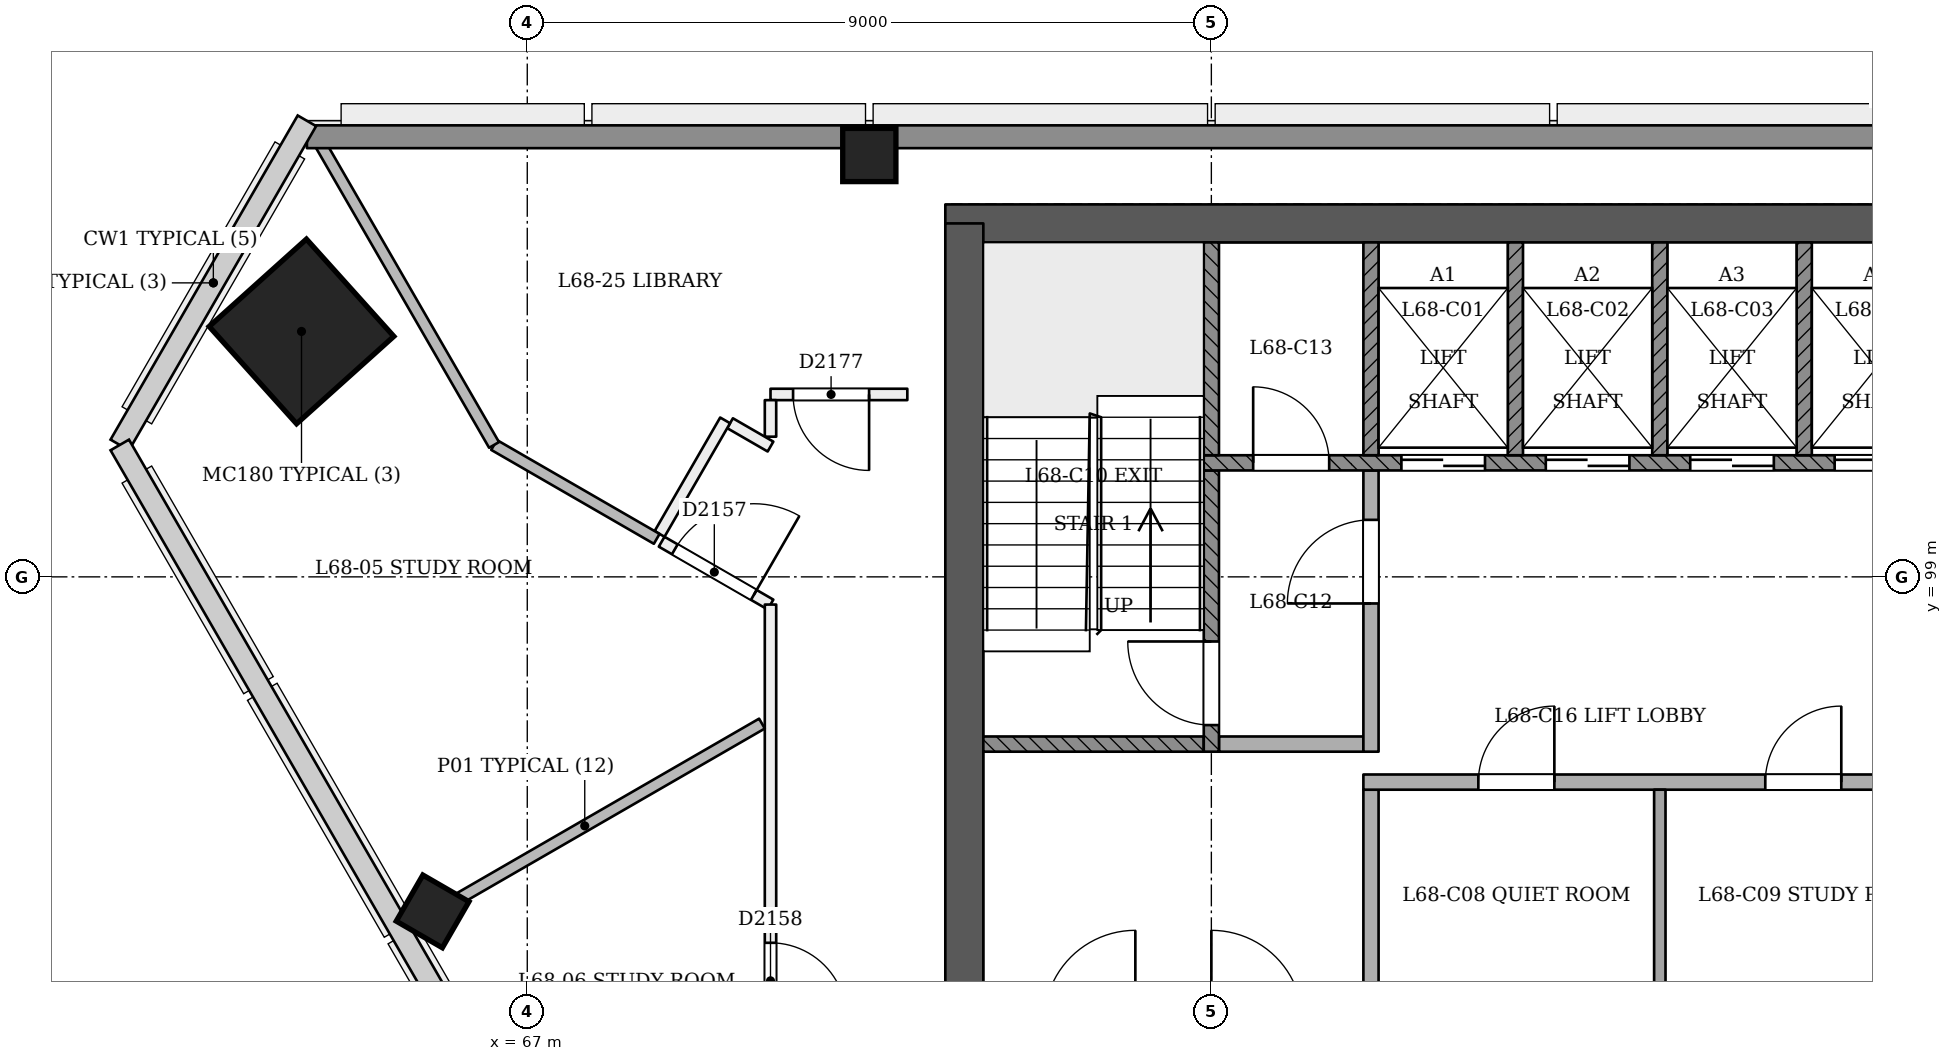
"""IFC4 building model, lengths in metres.
Left out: names, types, materials, properties, quantities, classifications, styles, units other than length and angle.
Written with IfcOpenShell. Run it as: python <this file> out.ifc"""

import sys

from ifc_helpers import new_model, si_unit, direction, frame, frame_2d, origin, origin_2d, place, context, subcontext, project, spatial, rectangle, extrude, element, fill, save


model = new_model("IFC4")
c1 = context("Model", 3, precision=1e-05, world=origin(), true_north=direction((0.0, 1.0)))
c2 = subcontext(c1, "Body", "Model", "MODEL_VIEW")
j1 = project(units=[si_unit("LENGTHUNIT", "METRE"), si_unit("PLANEANGLEUNIT", "RADIAN")], contexts=[c1])
p1 = place(None, origin())
s1 = spatial("IfcSite", under=j1, at=p1, CompositionType="ELEMENT")
p2 = place(p1, origin())
s2 = spatial("IfcBuilding", under=s1, at=p2, CompositionType="ELEMENT")
p3 = place(p2, frame((0.0, 0.0, 264.4)))
s3 = spatial("IfcBuildingStorey", under=s2, at=p3, CompositionType="ELEMENT", Elevation=264.4)
p4 = place(p3, frame((97.25, 103.65, 0.0), z_axis=(0.0, 0.0, 1.0), x_axis=(-1.0, 0.0, 0.0)))
e1 = element("IfcWall", 1, at=p4, inside=s3, PredefinedType="SHEAR", context=c2, shape_type="SweptSolid", body=[
    extrude(rectangle(XDim=24.75, YDim=0.5, at=frame_2d((12.375, 0.0))), origin(), (0.0, 0.0, 1.0), 3.6),
])
p5 = place(p3, frame((72.75, 103.65, 0.0), z_axis=(0.0, 0.0, 1.0), x_axis=(0.0, -1.0, 0.0)))
e2 = element("IfcWall", 2, at=p5, inside=s3, PredefinedType="SHEAR", context=c2, shape_type="SweptSolid", body=[
    extrude(rectangle(XDim=10.75, YDim=0.5, at=frame_2d((5.375, 0.0))), origin(), (0.0, 0.0, 1.0), 3.6),
])
p6 = place(p3, frame((63.996, 102.218, 0.0), z_axis=(0.028401814599, 0.009218727412, 0.999554076572), x_axis=(-0.865120184501, 0.501167311781, 0.019959758776)))
e3 = element("IfcColumn", 3, at=p6, inside=s3, PredefinedType="COLUMN", context=c2, shape_type="SweptSolid", body=[
    extrude(rectangle(XDim=1.72, YDim=1.72, at=origin_2d()), origin(), (0.0, 0.0, 1.0), 3.602),
])
p7 = place(p3, frame((71.5, 104.55, 0.0), z_axis=(0.0, 0.0, 1.0), x_axis=(1.0, 0.0, 0.0)))
e4 = element("IfcColumn", 4, at=p7, inside=s3, PredefinedType="COLUMN", context=c2, shape_type="SweptSolid", body=[
    extrude(rectangle(XDim=0.7, YDim=0.7, at=origin_2d()), origin(), (0.0, 0.0, 1.0), 3.6),
])
p8 = place(p3, frame((65.728, 94.552, -0.023), z_axis=(0.022212328788, 0.038465252292, 0.999013031354), x_axis=(-0.86563975744, -0.499187423735, 0.03846721103)))
e5 = element("IfcColumn", 5, at=p8, inside=s3, PredefinedType="COLUMN", context=c2, shape_type="SweptSolid", body=[
    extrude(rectangle(XDim=0.7, YDim=0.7, at=origin_2d()), origin(), (0.0, 0.0, 1.0), 3.605),
])
p9 = place(p3, frame((68.768, 99.462, 0.0), z_axis=(0.0, 0.0, 1.0), x_axis=(0.866072496716, -0.499918423778, 0.0)))
e6 = element("IfcWall", 6, at=p9, inside=s3, PredefinedType="PARTITIONING", context=c2, shape_type="SweptSolid", body=[
    extrude(rectangle(XDim=1.654, YDim=0.15, at=frame_2d((0.827, 0.0))), origin(), (0.0, 0.0, 1.0), 3.2),
])
p10 = place(p9, frame((0.2, 0.0, 0.0)))
e7 = element("IfcOpeningElement", 7, at=p10, cuts=e6, PredefinedType="OPENING", context=c2, shape_type="SweptSolid", body=[
    extrude(rectangle(XDim=1.2, YDim=2.1, at=frame_2d((0.6, 1.05))), frame((0.0, 0.085, 0.0), z_axis=(0.0, -1.0, 0.0), x_axis=(1.0, 0.0, 0.0)), (0.0, 0.0, 1.0), 0.171),
])
p11 = place(p3, frame((70.2, 98.636, 0.0), z_axis=(0.0, 0.0, 1.0), x_axis=(0.0, -1.0, 0.0)))
e8 = element("IfcWall", 8, at=p11, inside=s3, PredefinedType="PARTITIONING", context=c2, shape_type="SweptSolid", body=[
    extrude(rectangle(XDim=8.036, YDim=0.15, at=frame_2d((4.018, 0.0))), origin(), (0.0, 0.0, 1.0), 3.2),
])
p12 = place(p11, frame((4.45, 0.0, 0.0)))
e9 = element("IfcOpeningElement", 9, at=p12, cuts=e8, PredefinedType="OPENING", context=c2, shape_type="SweptSolid", body=[
    extrude(rectangle(XDim=1.0, YDim=2.1, at=frame_2d((0.5, 1.05))), frame((0.0, 0.085, 0.0), z_axis=(0.0, -1.0, 0.0), x_axis=(1.0, 0.0, 0.0)), (0.0, 0.0, 1.0), 0.171),
])
p13 = place(p3, frame((72.0, 101.4, 0.0), z_axis=(0.0, 0.0, 1.0), x_axis=(-1.0, 0.0, 0.0)))
e10 = element("IfcWall", 10, at=p13, inside=s3, PredefinedType="PARTITIONING", context=c2, shape_type="SweptSolid", body=[
    extrude(rectangle(XDim=1.8, YDim=0.15, at=frame_2d((0.9, 0.0))), origin(), (0.0, 0.0, 1.0), 3.2),
])
p14 = place(p13, frame((0.503, 0.0, 0.0)))
e11 = element("IfcOpeningElement", 11, at=p14, cuts=e10, PredefinedType="OPENING", context=c2, shape_type="SweptSolid", body=[
    extrude(rectangle(XDim=1.0, YDim=2.1, at=frame_2d((0.5, 1.05))), frame((0.0, 0.085, 0.0), z_axis=(0.0, -1.0, 0.0), x_axis=(1.0, 0.0, 0.0)), (0.0, 0.0, 1.0), 0.171),
])
p15 = place(p3, frame((70.2, 101.325, 0.0), z_axis=(0.0, 0.0, 1.0), x_axis=(0.0, -1.0, 0.0)))
e12 = element("IfcWall", 12, at=p15, inside=s3, PredefinedType="PARTITIONING", context=c2, shape_type="SweptSolid", body=[
    extrude(rectangle(XDim=0.481, YDim=0.15, at=frame_2d((0.24, 0.0))), origin(), (0.0, 0.0, 1.0), 3.2),
])
p16 = place(p3, frame((70.2, 100.714, 0.0), z_axis=(0.0, 0.0, 1.0), x_axis=(-0.866033360935, 0.499986217557, 0.0)))
e13 = element("IfcWall", 13, at=p16, inside=s3, PredefinedType="PARTITIONING", context=c2, shape_type="SweptSolid", body=[
    extrude(rectangle(XDim=0.614, YDim=0.15, at=frame_2d((0.307, 0.0))), origin(), (0.0, 0.0, 1.0), 3.2),
])
p17 = place(p3, frame((69.603, 101.059, 0.0), z_axis=(0.0, 0.0, 1.0), x_axis=(-0.500020560727, -0.866013532718, 0.0)))
e14 = element("IfcWall", 14, at=p17, inside=s3, PredefinedType="PARTITIONING", context=c2, shape_type="SweptSolid", body=[
    extrude(rectangle(XDim=1.725, YDim=0.15, at=frame_2d((0.863, 0.0))), origin(), (0.0, 0.0, 1.0), 3.2),
])
p18 = place(p3, frame((65.425, 94.378, 0.0), z_axis=(0.0, 0.0, 1.0), x_axis=(0.866018689825, 0.500011628738, 0.0)))
e15 = element("IfcWall", 15, at=p18, inside=s3, PredefinedType="PARTITIONING", context=c2, shape_type="SweptSolid", body=[
    extrude(rectangle(XDim=5.384, YDim=0.15, at=frame_2d((2.692, 0.0))), origin(), (0.0, 0.0, 1.0), 2.7),
])
p19 = place(p3, frame((68.703, 99.5, 0.0), z_axis=(0.0, 0.0, 1.0), x_axis=(-0.866002946681, 0.500038894826, 0.0)))
e16 = element("IfcWall", 16, at=p19, inside=s3, PredefinedType="PARTITIONING", context=c2, shape_type="SweptSolid", body=[
    extrude(rectangle(XDim=2.471, YDim=0.15, at=frame_2d((1.235, 0.0))), origin(), (0.0, 0.0, 1.0), 3.2),
])
p20 = place(p3, frame((66.563, 100.736, 0.0), z_axis=(0.0, 0.0, 1.0), x_axis=(-0.500005196218, 0.866022403726, 0.0)))
e17 = element("IfcWall", 17, at=p20, inside=s3, PredefinedType="PARTITIONING", context=c2, shape_type="SweptSolid", body=[
    extrude(rectangle(XDim=4.809, YDim=0.15, at=frame_2d((2.404, 0.0))), origin(), (0.0, 0.0, 1.0), 2.7),
])
p21 = place(p3, frame((64.101, 104.79, 0.0), z_axis=(0.0, 0.0, 1.0), x_axis=(1.0, 0.0, 0.0)))
e18 = element("IfcWall", 18, at=p21, inside=s3, PredefinedType="SOLIDWALL", context=c2, shape_type="SweptSolid", body=[
    extrude(rectangle(XDim=41.798, YDim=0.3, at=frame_2d((20.899, 0.0))), origin(), (0.0, 0.0, 1.0), 2.7),
])
p22 = place(p3, frame((78.1, 93.4, 0.0), z_axis=(0.0, 0.0, 1.0), x_axis=(0.0, 1.0, 0.0)))
e19 = element("IfcWall", 19, at=p22, inside=s3, PredefinedType="PARTITIONING", context=c2, shape_type="SweptSolid", body=[
    extrude(rectangle(XDim=2.8, YDim=0.2, at=frame_2d((1.4, 0.0))), origin(), (0.0, 0.0, 1.0), 3.2),
])
p23 = place(p3, frame((81.9, 93.4, 0.0), z_axis=(0.0, 0.0, 1.0), x_axis=(0.0, 1.0, 0.0)))
e20 = element("IfcWall", 20, at=p23, inside=s3, PredefinedType="PARTITIONING", context=c2, shape_type="SweptSolid", body=[
    extrude(rectangle(XDim=2.8, YDim=0.15, at=frame_2d((1.4, 0.0))), origin(), (0.0, 0.0, 1.0), 3.2),
])
p24 = place(p3, frame((78.0, 96.3, 0.0), z_axis=(0.0, 0.0, 1.0), x_axis=(1.0, 0.0, 0.0)))
e21 = element("IfcWall", 21, at=p24, inside=s3, PredefinedType="PARTITIONING", context=c2, shape_type="SweptSolid", body=[
    extrude(rectangle(XDim=7.8, YDim=0.2, at=frame_2d((3.9, 0.0))), origin(), (0.0, 0.0, 1.0), 3.2),
])
p25 = place(p24, frame((1.512, 0.0, 0.0)))
e22 = element("IfcOpeningElement", 22, at=p25, cuts=e21, PredefinedType="OPENING", context=c2, shape_type="SweptSolid", body=[
    extrude(rectangle(XDim=1.0, YDim=2.1, at=frame_2d((0.5, 1.05))), frame((0.0, 0.11, 0.0), z_axis=(0.0, -1.0, 0.0), x_axis=(1.0, 0.0, 0.0)), (0.0, 0.0, 1.0), 0.221),
])
p26 = place(p24, frame((5.288, 0.0, 0.0)))
e23 = element("IfcOpeningElement", 23, at=p26, cuts=e21, PredefinedType="OPENING", context=c2, shape_type="SweptSolid", body=[
    extrude(rectangle(XDim=1.0, YDim=2.1, at=frame_2d((0.5, 1.05))), frame((0.0, 0.11, 0.0), z_axis=(0.0, -1.0, 0.0), x_axis=(1.0, 0.0, 0.0)), (0.0, 0.0, 1.0), 0.221),
])
p27 = place(p3, frame((73.0, 96.8, 0.0), z_axis=(0.0, 0.0, 1.0), x_axis=(1.0, 0.0, 0.0)))
e24 = element("IfcWall", 24, at=p27, inside=s3, PredefinedType="SOLIDWALL", context=c2, shape_type="SweptSolid", body=[
    extrude(rectangle(XDim=2.9, YDim=0.2, at=frame_2d((1.45, 0.0))), origin(), (0.0, 0.0, 1.0), 3.2),
])
p28 = place(p3, frame((76.0, 96.7, 0.0), z_axis=(0.0, 0.0, 1.0), x_axis=(0.0, 1.0, 0.0)))
e25 = element("IfcWall", 25, at=p28, inside=s3, PredefinedType="SOLIDWALL", context=c2, shape_type="SweptSolid", body=[
    extrude(rectangle(XDim=3.7, YDim=0.2, at=frame_2d((1.85, 0.0))), origin(), (0.0, 0.0, 1.0), 3.2),
])
p29 = place(p28, frame((0.35, 0.0, 0.0)))
e26 = element("IfcOpeningElement", 26, at=p29, cuts=e25, PredefinedType="OPENING", context=c2, shape_type="SweptSolid", body=[
    extrude(rectangle(XDim=1.1, YDim=2.1, at=frame_2d((0.55, 1.05))), frame((0.0, 0.11, 0.0), z_axis=(0.0, -1.0, 0.0), x_axis=(1.0, 0.0, 0.0)), (0.0, 0.0, 1.0), 0.221),
])
p30 = place(p3, frame((76.1, 96.8, 0.0), z_axis=(0.0, 0.0, 1.0), x_axis=(1.0, 0.0, 0.0)))
e27 = element("IfcWall", 27, at=p30, inside=s3, PredefinedType="PARTITIONING", context=c2, shape_type="SweptSolid", body=[
    extrude(rectangle(XDim=1.9, YDim=0.2, at=frame_2d((0.95, 0.0))), origin(), (0.0, 0.0, 1.0), 3.2),
])
p31 = place(p3, frame((78.1, 96.7, 0.0), z_axis=(0.0, 0.0, 1.0), x_axis=(0.0, 1.0, 0.0)))
e28 = element("IfcWall", 28, at=p31, inside=s3, PredefinedType="PARTITIONING", context=c2, shape_type="SweptSolid", body=[
    extrude(rectangle(XDim=3.7, YDim=0.2, at=frame_2d((1.85, 0.0))), origin(), (0.0, 0.0, 1.0), 3.2),
])
p32 = place(p31, frame((1.95, 0.0, 0.0)))
e29 = element("IfcOpeningElement", 29, at=p32, cuts=e28, PredefinedType="OPENING", context=c2, shape_type="SweptSolid", body=[
    extrude(rectangle(XDim=1.1, YDim=2.1, at=frame_2d((0.55, 1.05))), frame((0.0, 0.11, 0.0), z_axis=(0.0, -1.0, 0.0), x_axis=(1.0, 0.0, 0.0)), (0.0, 0.0, 1.0), 0.221),
])
p33 = place(p3, frame((75.9, 100.5, 0.0), z_axis=(0.0, 0.0, 1.0), x_axis=(1.0, 0.0, 0.0)))
e30 = element("IfcWall", 30, at=p33, inside=s3, PredefinedType="SOLIDWALL", context=c2, shape_type="SweptSolid", body=[
    extrude(rectangle(XDim=18.2, YDim=0.2, at=frame_2d((9.1, 0.0))), origin(), (0.0, 0.0, 1.0), 3.2),
])
p34 = place(p33, frame((2.6, 0.0, 0.0)))
e31 = element("IfcOpeningElement", 31, at=p34, cuts=e30, PredefinedType="OPENING", context=c2, shape_type="SweptSolid", body=[
    extrude(rectangle(XDim=1.1, YDim=2.1, at=frame_2d((0.55, 1.05))), frame((0.0, 0.11, 0.0), z_axis=(0.0, -1.0, 0.0), x_axis=(1.0, 0.0, 0.0)), (0.0, 0.0, 1.0), 0.221),
])
p35 = place(p33, frame((4.5, 0.0, 0.0)))
e32 = element("IfcOpeningElement", 32, at=p35, cuts=e30, PredefinedType="OPENING", context=c2, shape_type="SweptSolid", body=[
    extrude(rectangle(XDim=1.1, YDim=2.1, at=frame_2d((0.55, 1.05))), frame((0.0, 0.11, 0.0), z_axis=(0.0, -1.0, 0.0), x_axis=(1.0, 0.0, 0.0)), (0.0, 0.0, 1.0), 0.221),
])
p36 = place(p33, frame((6.4, 0.0, 0.0)))
e33 = element("IfcOpeningElement", 33, at=p36, cuts=e30, PredefinedType="OPENING", context=c2, shape_type="SweptSolid", body=[
    extrude(rectangle(XDim=1.1, YDim=2.1, at=frame_2d((0.55, 1.05))), frame((0.0, 0.11, 0.0), z_axis=(0.0, -1.0, 0.0), x_axis=(1.0, 0.0, 0.0)), (0.0, 0.0, 1.0), 0.221),
])
p37 = place(p33, frame((8.3, 0.0, 0.0)))
e34 = element("IfcOpeningElement", 34, at=p37, cuts=e30, PredefinedType="OPENING", context=c2, shape_type="SweptSolid", body=[
    extrude(rectangle(XDim=1.1, YDim=2.1, at=frame_2d((0.55, 1.05))), frame((0.0, 0.11, 0.0), z_axis=(0.0, -1.0, 0.0), x_axis=(1.0, 0.0, 0.0)), (0.0, 0.0, 1.0), 0.221),
])
p38 = place(p33, frame((10.2, 0.0, 0.0)))
e35 = element("IfcOpeningElement", 35, at=p38, cuts=e30, PredefinedType="OPENING", context=c2, shape_type="SweptSolid", body=[
    extrude(rectangle(XDim=1.1, YDim=2.1, at=frame_2d((0.55, 1.05))), frame((0.0, 0.11, 0.0), z_axis=(0.0, -1.0, 0.0), x_axis=(1.0, 0.0, 0.0)), (0.0, 0.0, 1.0), 0.221),
])
p39 = place(p33, frame((12.1, 0.0, 0.0)))
e36 = element("IfcOpeningElement", 36, at=p39, cuts=e30, PredefinedType="OPENING", context=c2, shape_type="SweptSolid", body=[
    extrude(rectangle(XDim=1.1, YDim=2.1, at=frame_2d((0.55, 1.05))), frame((0.0, 0.11, 0.0), z_axis=(0.0, -1.0, 0.0), x_axis=(1.0, 0.0, 0.0)), (0.0, 0.0, 1.0), 0.221),
])
p40 = place(p33, frame((14.0, 0.0, 0.0)))
e37 = element("IfcOpeningElement", 37, at=p40, cuts=e30, PredefinedType="OPENING", context=c2, shape_type="SweptSolid", body=[
    extrude(rectangle(XDim=1.1, YDim=2.1, at=frame_2d((0.55, 1.05))), frame((0.0, 0.11, 0.0), z_axis=(0.0, -1.0, 0.0), x_axis=(1.0, 0.0, 0.0)), (0.0, 0.0, 1.0), 0.221),
])
p41 = place(p33, frame((0.65, 0.0, 0.0)))
e38 = element("IfcOpeningElement", 38, at=p41, cuts=e30, PredefinedType="OPENING", context=c2, shape_type="SweptSolid", body=[
    extrude(rectangle(XDim=1.0, YDim=2.1, at=frame_2d((0.5, 1.05))), frame((0.0, 0.11, 0.0), z_axis=(0.0, -1.0, 0.0), x_axis=(1.0, 0.0, 0.0)), (0.0, 0.0, 1.0), 0.221),
])
p42 = place(p33, frame((16.3, 0.0, 0.0)))
e39 = element("IfcOpeningElement", 39, at=p42, cuts=e30, PredefinedType="OPENING", context=c2, shape_type="SweptSolid", body=[
    extrude(rectangle(XDim=1.0, YDim=2.1, at=frame_2d((0.5, 1.05))), frame((0.0, 0.11, 0.0), z_axis=(0.0, -1.0, 0.0), x_axis=(1.0, 0.0, 0.0)), (0.0, 0.0, 1.0), 0.221),
])
for number, where, z_axis, x_axis in (
    (40, (76.0, 100.6, 0.0), (0.0, 0.0, 1.0), (0.0, 1.0, 0.0)),
    (41, (78.1, 100.6, 0.0), (0.0, 0.0, 1.0), (0.0, 1.0, 0.0)),
    (42, (80.0, 100.6, 0.0), (0.0, 0.0, 1.0), (0.0, 1.0, 0.0)),
    (43, (81.9, 100.6, 0.0), (0.0, 0.0, 1.0), (0.0, 1.0, 0.0)),
    (44, (83.8, 100.6, 0.0), (0.0, 0.0, 1.0), (0.0, 1.0, 0.0)),
):
    element("IfcWall", number, at=place(p3, frame(where, z_axis=z_axis, x_axis=x_axis)), inside=s3, PredefinedType="SOLIDWALL", context=c2, shape_type="SweptSolid", body=[
        extrude(rectangle(XDim=2.8, YDim=0.2, at=frame_2d((1.4, 0.0))), origin(), (0.0, 0.0, 1.0), 3.2),
    ])
p43 = place(p10, origin())
e45 = element("IfcDoor", 45, at=p43, inside=s3, OperationType="SINGLE_SWING_RIGHT", PredefinedType="NOTDEFINED", context=c2, shape_type="SweptSolid", body=[
    extrude(rectangle(XDim=1.2, YDim=2.1, at=frame_2d((0.6, 1.05))), frame((0.0, 0.025, 0.0), z_axis=(0.0, -1.0, 0.0), x_axis=(1.0, 0.0, 0.0)), (0.0, 0.0, 1.0), 0.05),
])
fill(e7, e45)
p44 = place(p12, origin())
e46 = element("IfcDoor", 46, at=p44, inside=s3, OperationType="SINGLE_SWING_RIGHT", PredefinedType="NOTDEFINED", context=c2, shape_type="SweptSolid", body=[
    extrude(rectangle(XDim=1.0, YDim=2.1, at=frame_2d((0.5, 1.05))), frame((0.0, 0.025, 0.0), z_axis=(0.0, -1.0, 0.0), x_axis=(1.0, 0.0, 0.0)), (0.0, 0.0, 1.0), 0.05),
])
fill(e9, e46)
p45 = place(p14, origin())
e47 = element("IfcDoor", 47, at=p45, inside=s3, OperationType="SINGLE_SWING_LEFT", PredefinedType="NOTDEFINED", context=c2, shape_type="SweptSolid", body=[
    extrude(rectangle(XDim=1.0, YDim=2.1, at=frame_2d((0.5, 1.05))), frame((0.0, 0.025, 0.0), z_axis=(0.0, -1.0, 0.0), x_axis=(1.0, 0.0, 0.0)), (0.0, 0.0, 1.0), 0.05),
])
fill(e11, e47)
p46 = place(p34, origin())
e48 = element("IfcDoor", 48, at=p46, inside=s3, OperationType="SLIDING_TO_RIGHT", PredefinedType="NOTDEFINED", context=c2, shape_type="SweptSolid", body=[
    extrude(rectangle(XDim=1.1, YDim=2.1, at=frame_2d((0.55, 1.05))), frame((0.0, 0.025, 0.0), z_axis=(0.0, -1.0, 0.0), x_axis=(1.0, 0.0, 0.0)), (0.0, 0.0, 1.0), 0.05),
])
fill(e31, e48)
p47 = place(p35, origin())
e49 = element("IfcDoor", 49, at=p47, inside=s3, OperationType="SLIDING_TO_LEFT", PredefinedType="NOTDEFINED", context=c2, shape_type="SweptSolid", body=[
    extrude(rectangle(XDim=1.1, YDim=2.1, at=frame_2d((0.55, 1.05))), frame((0.0, 0.025, 0.0), z_axis=(0.0, -1.0, 0.0), x_axis=(1.0, 0.0, 0.0)), (0.0, 0.0, 1.0), 0.05),
])
fill(e32, e49)
p48 = place(p36, origin())
e50 = element("IfcDoor", 50, at=p48, inside=s3, OperationType="SLIDING_TO_RIGHT", PredefinedType="NOTDEFINED", context=c2, shape_type="SweptSolid", body=[
    extrude(rectangle(XDim=1.1, YDim=2.1, at=frame_2d((0.55, 1.05))), frame((0.0, 0.025, 0.0), z_axis=(0.0, -1.0, 0.0), x_axis=(1.0, 0.0, 0.0)), (0.0, 0.0, 1.0), 0.05),
])
fill(e33, e50)
p49 = place(p37, origin())
e51 = element("IfcDoor", 51, at=p49, inside=s3, OperationType="SLIDING_TO_LEFT", PredefinedType="NOTDEFINED", context=c2, shape_type="SweptSolid", body=[
    extrude(rectangle(XDim=1.1, YDim=2.1, at=frame_2d((0.55, 1.05))), frame((0.0, 0.025, 0.0), z_axis=(0.0, -1.0, 0.0), x_axis=(1.0, 0.0, 0.0)), (0.0, 0.0, 1.0), 0.05),
])
fill(e34, e51)
p50 = place(p29, origin())
e52 = element("IfcDoor", 52, at=p50, inside=s3, OperationType="SINGLE_SWING_RIGHT", PredefinedType="NOTDEFINED", context=c2, shape_type="SweptSolid", body=[
    extrude(rectangle(XDim=1.1, YDim=2.1, at=frame_2d((0.55, 1.05))), frame((0.0, 0.025, 0.0), z_axis=(0.0, -1.0, 0.0), x_axis=(1.0, 0.0, 0.0)), (0.0, 0.0, 1.0), 0.05),
])
fill(e26, e52)
p51 = place(p32, origin())
e53 = element("IfcDoor", 53, at=p51, inside=s3, OperationType="SINGLE_SWING_LEFT", PredefinedType="NOTDEFINED", context=c2, shape_type="SweptSolid", body=[
    extrude(rectangle(XDim=1.1, YDim=2.1, at=frame_2d((0.55, 1.05))), frame((0.0, 0.025, 0.0), z_axis=(0.0, -1.0, 0.0), x_axis=(1.0, 0.0, 0.0)), (0.0, 0.0, 1.0), 0.05),
])
fill(e29, e53)
p52 = place(p41, origin())
e54 = element("IfcDoor", 54, at=p52, inside=s3, OperationType="SINGLE_SWING_LEFT", PredefinedType="NOTDEFINED", context=c2, shape_type="SweptSolid", body=[
    extrude(rectangle(XDim=1.0, YDim=2.1, at=frame_2d((0.5, 1.05))), frame((0.0, 0.025, 0.0), z_axis=(0.0, -1.0, 0.0), x_axis=(1.0, 0.0, 0.0)), (0.0, 0.0, 1.0), 0.05),
])
fill(e38, e54)
p53 = place(p25, origin())
e55 = element("IfcDoor", 55, at=p53, inside=s3, OperationType="SINGLE_SWING_RIGHT", PredefinedType="NOTDEFINED", context=c2, shape_type="SweptSolid", body=[
    extrude(rectangle(XDim=1.0, YDim=2.1, at=frame_2d((0.5, 1.05))), frame((0.0, 0.025, 0.0), z_axis=(0.0, -1.0, 0.0), x_axis=(1.0, 0.0, 0.0)), (0.0, 0.0, 1.0), 0.05),
])
fill(e22, e55)
p54 = place(p26, origin())
e56 = element("IfcDoor", 56, at=p54, inside=s3, OperationType="SINGLE_SWING_RIGHT", PredefinedType="NOTDEFINED", context=c2, shape_type="SweptSolid", body=[
    extrude(rectangle(XDim=1.0, YDim=2.1, at=frame_2d((0.5, 1.05))), frame((0.0, 0.025, 0.0), z_axis=(0.0, -1.0, 0.0), x_axis=(1.0, 0.0, 0.0)), (0.0, 0.0, 1.0), 0.05),
])
fill(e23, e56)
save(model, sys.argv[1])
